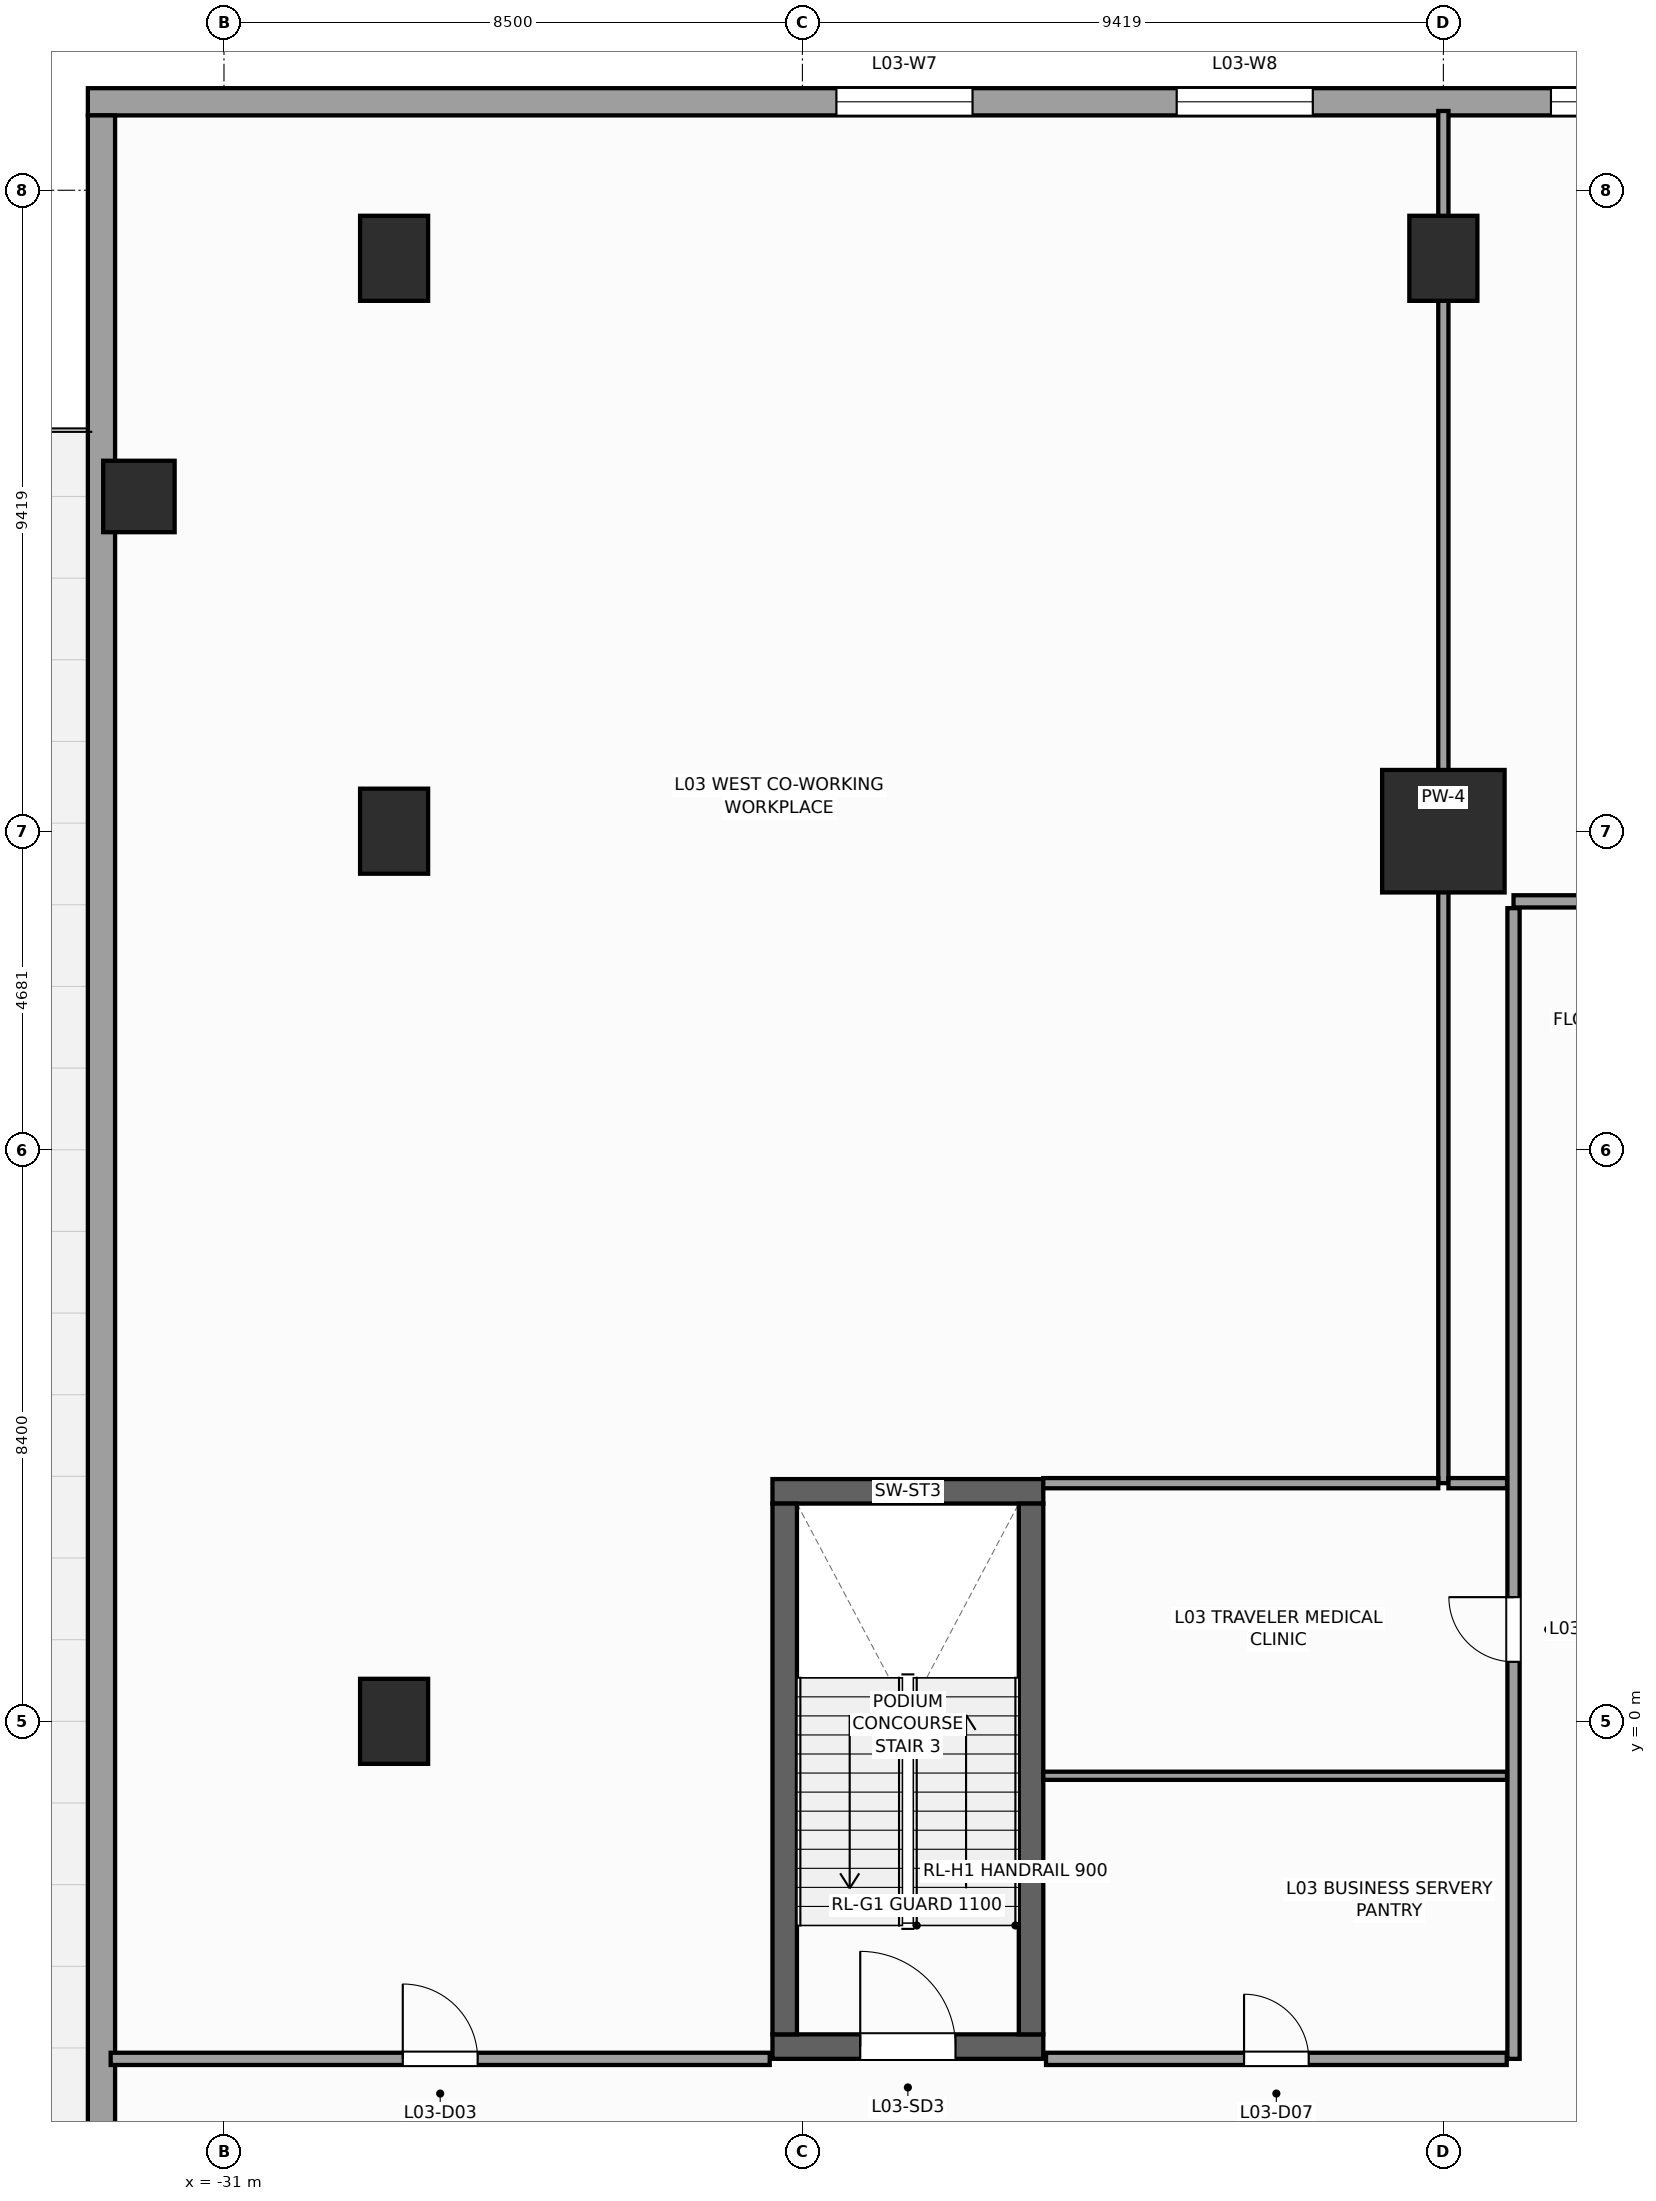
"""IFC4 building model, lengths in metres.
Left out: names, types, materials, properties, quantities, classifications, styles, units other than length and angle.
Written with IfcOpenShell. Run it as: python <this file> out.ifc"""

import sys

from ifc_helpers import new_model, si_unit, direction, frame, frame_2d, origin, origin_2d, place, context, subcontext, project, spatial, rectangle, extrude, source, transform, mapped, element, fill, save


model = new_model("IFC4")
c1 = context("Model", 3, precision=1e-05, world=origin(), true_north=direction((0.0, 1.0)))
c2 = subcontext(c1, "Body", "Model", "MODEL_VIEW")
j1 = project(units=[si_unit("LENGTHUNIT", "METRE"), si_unit("PLANEANGLEUNIT", "RADIAN")], contexts=[c1])
p1 = place(None, origin())
s1 = spatial("IfcSite", under=j1, at=p1, CompositionType="ELEMENT")
p2 = place(p1, origin())
s2 = spatial("IfcBuilding", under=s1, at=p2, CompositionType="ELEMENT")
p3 = place(p2, frame((0.0, 0.0, 16.0)))
s3 = spatial("IfcBuildingStorey", under=s2, at=p3, CompositionType="ELEMENT", Elevation=16.0)
p4 = place(p3, frame((-22.94, -4.78, 0.0), z_axis=(0.0, 0.0, 1.0), x_axis=(1.0, 0.0, 0.0)))
e1 = element("IfcWall", 1, at=p4, inside=s3, PredefinedType="SHEAR", context=c2, shape_type="SweptSolid", body=[
    extrude(rectangle(XDim=3.98, YDim=0.36, at=frame_2d((1.99, 0.0))), origin(), (0.0, 0.0, 1.0), 5.0),
])
p5 = place(p4, frame((1.29, 0.0, 0.0)))
e2 = element("IfcOpeningElement", 2, at=p5, cuts=e1, PredefinedType="OPENING", context=c2, shape_type="SweptSolid", body=[
    extrude(rectangle(XDim=1.4, YDim=2.2, at=frame_2d((0.7, 1.1))), frame((0.0, 0.19, 0.0), z_axis=(0.0, -1.0, 0.0), x_axis=(1.0, 0.0, 0.0)), (0.0, 0.0, 1.0), 0.38),
])
p6 = place(p3, frame((-22.94, 3.38, 0.0), z_axis=(0.0, 0.0, 1.0), x_axis=(1.0, 0.0, 0.0)))
e3 = element("IfcWall", 3, at=p6, inside=s3, PredefinedType="SHEAR", context=c2, shape_type="SweptSolid", body=[
    extrude(rectangle(XDim=3.98, YDim=0.36, at=frame_2d((1.99, 0.0))), origin(), (0.0, 0.0, 1.0), 5.0),
])
for number, where, z_axis, x_axis in (
    (4, (-22.76, -4.6, 0.0), (0.0, 0.0, 1.0), (0.0, 1.0, 0.0)),
    (5, (-19.14, -4.6, 0.0), (0.0, 0.0, 1.0), (0.0, 1.0, 0.0)),
):
    element("IfcWall", number, at=place(p3, frame(where, z_axis=z_axis, x_axis=x_axis)), inside=s3, PredefinedType="SHEAR", context=c2, shape_type="SweptSolid", body=[
        extrude(rectangle(XDim=7.8, YDim=0.36, at=frame_2d((3.9, 0.0))), origin(), (0.0, 0.0, 1.0), 5.0),
    ])
m1 = source(origin(), c2, "Body", "SweptSolid", [
    extrude(rectangle(XDim=1.8, YDim=1.8, at=origin_2d()), origin(), (0.0, 0.0, 1.0), 5.0),
])
p7 = place(p3, frame((-13.081, 13.081, 0.0), z_axis=(0.0, 0.0, 1.0), x_axis=(1.0, 0.0, 0.0)))
e6 = element("IfcColumn", 6, at=p7, inside=s3, PredefinedType="COLUMN", context=c2, shape_type="MappedRepresentation", body=[
    mapped(m1, transform((0.0, 0.0, 0.0), scale=1.0)),
])
m2 = source(origin(), c2, "Body", "SweptSolid", [
    extrude(rectangle(XDim=1.0, YDim=1.25, at=origin_2d()), origin(), (0.0, 0.0, 1.0), 5.0),
])
for number, where, z_axis, x_axis in (
    (7, (-28.5, 21.5, 0.0), (0.0, 0.0, 1.0), (1.0, 0.0, 0.0)),
    (8, (-13.081, 21.5, 0.0), (0.0, 0.0, 1.0), (1.0, 0.0, 0.0)),
    (9, (-28.5, 0.0, 0.0), (0.0, 0.0, 1.0), (1.0, 0.0, 0.0)),
    (10, (-28.5, 13.081, 0.0), (0.0, 0.0, 1.0), (1.0, 0.0, 0.0)),
):
    element("IfcColumn", number, at=place(p3, frame(where, z_axis=z_axis, x_axis=x_axis)), inside=s3, PredefinedType="COLUMN", context=c2, shape_type="MappedRepresentation", body=[
        mapped(m2, transform((0.0, 0.0, 0.0), scale=1.0)),
    ])
m3 = source(origin(), c2, "Body", "SweptSolid", [
    extrude(rectangle(XDim=1.05, YDim=1.05, at=origin_2d()), origin(), (0.0, 0.0, 1.0), 5.0),
])
p8 = place(p3, frame((-32.25, 18.0, 0.0), z_axis=(0.0, 0.0, 1.0), x_axis=(1.0, 0.0, 0.0)))
e11 = element("IfcColumn", 11, at=p8, inside=s3, PredefinedType="COLUMN", context=c2, shape_type="MappedRepresentation", body=[
    mapped(m3, transform((0.0, 0.0, 0.0), scale=1.0)),
])
p9 = place(p3, frame((-33.0, 23.8, 0.0), z_axis=(0.0, 0.0, 1.0), x_axis=(1.0, 0.0, 0.0)))
e12 = element("IfcWall", 12, at=p9, inside=s3, PredefinedType="STANDARD", context=c2, shape_type="SweptSolid", body=[
    extrude(rectangle(XDim=34.5, YDim=0.4, at=frame_2d((17.25, 0.0))), origin(), (0.0, 0.0, 1.0), 4.66),
])
p10 = place(p9, frame((11.0, 0.0, 0.85)))
e13 = element("IfcOpeningElement", 13, at=p10, cuts=e12, PredefinedType="OPENING", context=c2, shape_type="SweptSolid", body=[
    extrude(rectangle(XDim=2.0, YDim=2.8, at=frame_2d((1.0, 1.4))), frame((0.0, 0.21, 0.0), z_axis=(0.0, -1.0, 0.0), x_axis=(1.0, 0.0, 0.0)), (0.0, 0.0, 1.0), 0.42),
])
p11 = place(p9, frame((16.0, 0.0, 0.85)))
e14 = element("IfcOpeningElement", 14, at=p11, cuts=e12, PredefinedType="OPENING", context=c2, shape_type="SweptSolid", body=[
    extrude(rectangle(XDim=2.0, YDim=2.8, at=frame_2d((1.0, 1.4))), frame((0.0, 0.21, 0.0), z_axis=(0.0, -1.0, 0.0), x_axis=(1.0, 0.0, 0.0)), (0.0, 0.0, 1.0), 0.42),
])
p12 = place(p9, frame((21.5, 0.0, 0.85)))
e15 = element("IfcOpeningElement", 15, at=p12, cuts=e12, PredefinedType="OPENING", context=c2, shape_type="SweptSolid", body=[
    extrude(rectangle(XDim=2.0, YDim=2.8, at=frame_2d((1.0, 1.4))), frame((0.0, 0.21, 0.0), z_axis=(0.0, -1.0, 0.0), x_axis=(1.0, 0.0, 0.0)), (0.0, 0.0, 1.0), 0.42),
])
p13 = place(p3, frame((-32.8, -23.6, 0.0), z_axis=(0.0, 0.0, 1.0), x_axis=(0.0, 1.0, 0.0)))
e16 = element("IfcWall", 16, at=p13, inside=s3, PredefinedType="STANDARD", context=c2, shape_type="SweptSolid", body=[
    extrude(rectangle(XDim=47.2, YDim=0.4, at=frame_2d((23.6, 0.0))), origin(), (0.0, 0.0, 1.0), 4.66),
])
p14 = place(p13, frame((14.5, 0.0, 0.0)))
e17 = element("IfcOpeningElement", 17, at=p14, cuts=e16, PredefinedType="OPENING", context=c2, shape_type="SweptSolid", body=[
    extrude(rectangle(XDim=1.2, YDim=2.3, at=frame_2d((0.6, 1.15))), frame((0.0, 0.21, 0.0), z_axis=(0.0, -1.0, 0.0), x_axis=(1.0, 0.0, 0.0)), (0.0, 0.0, 1.0), 0.42),
])
p15 = place(p3, frame((-12.05, 12.05, 0.0), z_axis=(0.0, 0.0, 1.0), x_axis=(1.0, 0.0, 0.0)))
e18 = element("IfcWall", 18, at=p15, inside=s3, PredefinedType="PARTITIONING", context=c2, shape_type="SweptSolid", body=[
    extrude(rectangle(XDim=24.1, YDim=0.18, at=frame_2d((12.05, 0.0))), origin(), (0.0, 0.0, 1.0), 4.66),
])
p16 = place(p15, frame((5.639, 0.0, 0.0)))
e19 = element("IfcOpeningElement", 19, at=p16, cuts=e18, PredefinedType="OPENING", context=c2, shape_type="SweptSolid", body=[
    extrude(rectangle(XDim=1.1, YDim=2.2, at=frame_2d((0.55, 1.1))), frame((0.0, 0.1, 0.0), z_axis=(0.0, -1.0, 0.0), x_axis=(1.0, 0.0, 0.0)), (0.0, 0.0, 1.0), 0.2),
])
p17 = place(p15, frame((17.361, 0.0, 0.0)))
e20 = element("IfcOpeningElement", 20, at=p17, cuts=e18, PredefinedType="OPENING", context=c2, shape_type="SweptSolid", body=[
    extrude(rectangle(XDim=1.1, YDim=2.2, at=frame_2d((0.55, 1.1))), frame((0.0, 0.1, 0.0), z_axis=(0.0, -1.0, 0.0), x_axis=(1.0, 0.0, 0.0)), (0.0, 0.0, 1.0), 0.2),
])
p18 = place(p3, frame((-12.05, -4.96, 0.0), z_axis=(0.0, 0.0, 1.0), x_axis=(0.0, 1.0, 0.0)))
e21 = element("IfcWall", 21, at=p18, inside=s3, PredefinedType="PARTITIONING", context=c2, shape_type="SweptSolid", body=[
    extrude(rectangle(XDim=16.91, YDim=0.18, at=frame_2d((8.455, 0.0))), origin(), (0.0, 0.0, 1.0), 4.66),
])
p19 = place(p18, frame((5.835, 0.0, 0.0)))
e22 = element("IfcOpeningElement", 22, at=p19, cuts=e21, PredefinedType="OPENING", context=c2, shape_type="SweptSolid", body=[
    extrude(rectangle(XDim=0.95, YDim=2.15, at=frame_2d((0.475, 1.075))), frame((0.0, 0.1, 0.0), z_axis=(0.0, -1.0, 0.0), x_axis=(1.0, 0.0, 0.0)), (0.0, 0.0, 1.0), 0.2),
])
p20 = place(p3, frame((-32.665, -4.96, 0.0), z_axis=(0.0, 0.0, 1.0), x_axis=(1.0, 0.0, 0.0)))
e23 = element("IfcWall", 23, at=p20, inside=s3, PredefinedType="PARTITIONING", context=c2, shape_type="SweptSolid", body=[
    extrude(rectangle(XDim=9.685, YDim=0.18, at=frame_2d((4.843, 0.0))), origin(), (0.0, 0.0, 1.0), 4.66),
])
p21 = place(p20, frame((4.292, 0.0, 0.0)))
e24 = element("IfcOpeningElement", 24, at=p21, cuts=e23, PredefinedType="OPENING", context=c2, shape_type="SweptSolid", body=[
    extrude(rectangle(XDim=1.1, YDim=2.2, at=frame_2d((0.55, 1.1))), frame((0.0, 0.1, 0.0), z_axis=(0.0, -1.0, 0.0), x_axis=(1.0, 0.0, 0.0)), (0.0, 0.0, 1.0), 0.2),
])
p22 = place(p3, frame((-18.92, -4.96, 0.0), z_axis=(0.0, 0.0, 1.0), x_axis=(1.0, 0.0, 0.0)))
e25 = element("IfcWall", 25, at=p22, inside=s3, PredefinedType="PARTITIONING", context=c2, shape_type="SweptSolid", body=[
    extrude(rectangle(XDim=6.77, YDim=0.18, at=frame_2d((3.385, 0.0))), origin(), (0.0, 0.0, 1.0), 4.66),
])
p23 = place(p22, frame((2.91, 0.0, 0.0)))
e26 = element("IfcOpeningElement", 26, at=p23, cuts=e25, PredefinedType="OPENING", context=c2, shape_type="SweptSolid", body=[
    extrude(rectangle(XDim=0.95, YDim=2.15, at=frame_2d((0.475, 1.075))), frame((0.0, 0.1, 0.0), z_axis=(0.0, -1.0, 0.0), x_axis=(1.0, 0.0, 0.0)), (0.0, 0.0, 1.0), 0.2),
])
p24 = place(p3, frame((-13.081, 3.5, 0.0), z_axis=(0.0, 0.0, 1.0), x_axis=(0.0, 1.0, 0.0)))
e27 = element("IfcWall", 27, at=p24, inside=s3, PredefinedType="PARTITIONING", context=c2, shape_type="SweptSolid", body=[
    extrude(rectangle(XDim=20.165, YDim=0.15, at=frame_2d((10.083, 0.0))), origin(), (0.0, 0.0, 1.0), 3.652),
])
p25 = place(p3, frame((-18.96, 3.5, 0.0), z_axis=(0.0, 0.0, 1.0), x_axis=(1.0, 0.0, 0.0)))
e28 = element("IfcWall", 28, at=p25, inside=s3, PredefinedType="PARTITIONING", context=c2, shape_type="SweptSolid", body=[
    extrude(rectangle(XDim=5.804, YDim=0.15, at=frame_2d((2.902, 0.0))), origin(), (0.0, 0.0, 1.0), 4.66),
])
p26 = place(p3, frame((-13.006, 3.5, 0.0), z_axis=(0.0, 0.0, 1.0), x_axis=(1.0, 0.0, 0.0)))
e29 = element("IfcWall", 29, at=p26, inside=s3, PredefinedType="PARTITIONING", context=c2, shape_type="SweptSolid", body=[
    extrude(rectangle(XDim=0.861, YDim=0.15, at=frame_2d((0.431, 0.0))), origin(), (0.0, 0.0, 1.0), 4.66),
])
p27 = place(p3, frame((-18.96, -0.8, 0.0), z_axis=(0.0, 0.0, 1.0), x_axis=(1.0, 0.0, 0.0)))
e30 = element("IfcWall", 30, at=p27, inside=s3, PredefinedType="PARTITIONING", context=c2, shape_type="SweptSolid", body=[
    extrude(rectangle(XDim=6.815, YDim=0.12, at=frame_2d((3.407, 0.0))), origin(), (0.0, 0.0, 1.0), 4.66),
])
m4 = source(origin(), c2, "Body", "SweptSolid", [
    extrude(rectangle(XDim=2.0, YDim=2.8, at=frame_2d((1.0, 1.4))), frame((0.0, 0.03, 0.0), z_axis=(0.0, -1.0, 0.0), x_axis=(1.0, 0.0, 0.0)), (0.0, 0.0, 1.0), 0.06),
])
p28 = place(p10, origin())
e31 = element("IfcWindow", 31, at=p28, inside=s3, PartitioningType="SINGLE_PANEL", PredefinedType="WINDOW", context=c2, shape_type="MappedRepresentation", body=[
    mapped(m4, transform((0.0, 0.0, 0.0), scale=1.0)),
])
fill(e13, e31)
p29 = place(p11, origin())
e32 = element("IfcWindow", 32, at=p29, inside=s3, PartitioningType="SINGLE_PANEL", PredefinedType="WINDOW", context=c2, shape_type="MappedRepresentation", body=[
    mapped(m4, transform((0.0, 0.0, 0.0), scale=1.0)),
])
fill(e14, e32)
p30 = place(p12, origin())
e33 = element("IfcWindow", 33, at=p30, inside=s3, PartitioningType="SINGLE_PANEL", PredefinedType="WINDOW", context=c2, shape_type="MappedRepresentation", body=[
    mapped(m4, transform((0.0, 0.0, 0.0), scale=1.0)),
])
fill(e15, e33)
m5 = source(origin(), c2, "Body", "SweptSolid", [
    extrude(rectangle(XDim=1.4, YDim=2.2, at=frame_2d((0.7, 1.1))), frame((0.0, 0.025, 0.0), z_axis=(0.0, -1.0, 0.0), x_axis=(1.0, 0.0, 0.0)), (0.0, 0.0, 1.0), 0.05),
])
p31 = place(p5, origin())
e34 = element("IfcDoor", 34, at=p31, inside=s3, OperationType="SINGLE_SWING_LEFT", PredefinedType="DOOR", context=c2, shape_type="MappedRepresentation", body=[
    mapped(m5, transform((0.0, 0.0, 0.0), scale=1.0)),
])
fill(e2, e34)
m6 = source(origin(), c2, "Body", "SweptSolid", [
    extrude(rectangle(XDim=1.1, YDim=2.2, at=frame_2d((0.55, 1.1))), frame((0.0, 0.025, 0.0), z_axis=(0.0, -1.0, 0.0), x_axis=(1.0, 0.0, 0.0)), (0.0, 0.0, 1.0), 0.05),
])
p32 = place(p21, origin())
e35 = element("IfcDoor", 35, at=p32, inside=s3, OperationType="SINGLE_SWING_LEFT", PredefinedType="DOOR", context=c2, shape_type="MappedRepresentation", body=[
    mapped(m6, transform((0.0, 0.0, 0.0), scale=1.0)),
])
fill(e24, e35)
m7 = source(origin(), c2, "Body", "SweptSolid", [
    extrude(rectangle(XDim=0.95, YDim=2.15, at=frame_2d((0.475, 1.075))), frame((0.0, 0.025, 0.0), z_axis=(0.0, -1.0, 0.0), x_axis=(1.0, 0.0, 0.0)), (0.0, 0.0, 1.0), 0.05),
])
p33 = place(p23, origin())
e36 = element("IfcDoor", 36, at=p33, inside=s3, OperationType="SINGLE_SWING_LEFT", PredefinedType="DOOR", context=c2, shape_type="MappedRepresentation", body=[
    mapped(m7, transform((0.0, 0.0, 0.0), scale=1.0)),
])
fill(e26, e36)
p34 = place(p19, origin())
e37 = element("IfcDoor", 37, at=p34, inside=s3, OperationType="SINGLE_SWING_RIGHT", PredefinedType="DOOR", context=c2, shape_type="MappedRepresentation", body=[
    mapped(m7, transform((0.0, 0.0, 0.0), scale=1.0)),
])
fill(e22, e37)
save(model, sys.argv[1])
